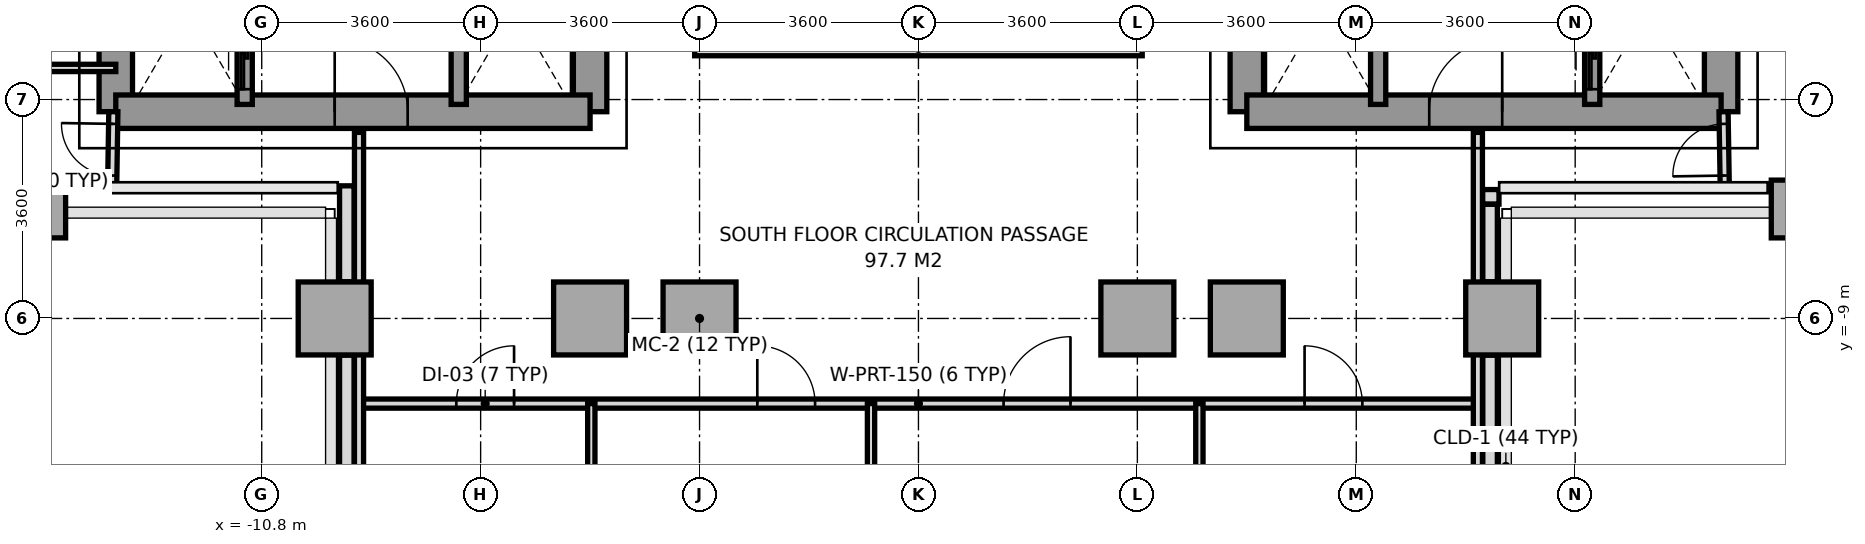
"""IFC4 building model, lengths in metres.
Left out: names, types, materials, properties, quantities, classifications, styles, units other than length and angle.
Written with IfcOpenShell. Run it as: python <this file> out.ifc"""

import sys

from ifc_helpers import new_model, si_unit, direction, frame, frame_2d, origin, origin_2d, place, context, subcontext, project, spatial, rectangle, extrude, source, transform, mapped, element, fill, save


model = new_model("IFC4")
c1 = context("Model", 3, precision=1e-05, world=origin(), true_north=direction((0.0, 1.0)))
c2 = subcontext(c1, "Body", "Model", "MODEL_VIEW")
j1 = project(units=[si_unit("LENGTHUNIT", "METRE"), si_unit("PLANEANGLEUNIT", "RADIAN")], contexts=[c1])
p1 = place(None, origin())
s1 = spatial("IfcSite", under=j1, at=p1, CompositionType="ELEMENT")
p2 = place(p1, origin())
s2 = spatial("IfcBuilding", under=s1, at=p2, CompositionType="ELEMENT")
p3 = place(p2, frame((0.0, 0.0, 71.4)))
s3 = spatial("IfcBuildingStorey", under=s2, at=p3, CompositionType="ELEMENT", Elevation=71.4)
m1 = source(origin(), c2, "Body", "SweptSolid", [
    extrude(rectangle(XDim=0.75, YDim=0.95, at=origin_2d()), origin(), (0.0, 0.0, 1.0), 3.2),
])
p4 = place(p3, frame((-14.4, -7.2, 0.0), z_axis=(0.0, 0.0, 1.0), x_axis=(1.0, 0.0, 0.0)))
e1 = element("IfcColumn", 1, at=p4, inside=s3, PredefinedType="COLUMN", context=c2, shape_type="MappedRepresentation", body=[
    mapped(m1, transform((0.0, 0.0, 0.0), x_axis=(1.0, 0.0, 0.0), y_axis=(0.0, 1.0, 0.0), z_axis=(0.0, 0.0, 1.0), scale=1.0)),
])
m2 = source(origin(), c2, "Body", "SweptSolid", [
    extrude(rectangle(XDim=1.2, YDim=1.2, at=origin_2d()), origin(), (0.0, 0.0, 1.0), 3.2),
])
for number, where, z_axis, x_axis in (
    (2, (-9.6, -9.0, 0.0), (0.0, 0.0, 1.0), (1.0, 0.0, 0.0)),
    (3, (-5.4, -9.0, 0.0), (0.0, 0.0, 1.0), (1.0, 0.0, 0.0)),
    (4, (-3.6, -9.0, 0.0), (0.0, 0.0, 1.0), (1.0, 0.0, 0.0)),
    (5, (3.6, -9.0, 0.0), (0.0, 0.0, 1.0), (1.0, 0.0, 0.0)),
    (6, (5.4, -9.0, 0.0), (0.0, 0.0, 1.0), (1.0, 0.0, 0.0)),
    (7, (9.6, -9.0, 0.0), (0.0, 0.0, 1.0), (1.0, 0.0, 0.0)),
):
    element("IfcColumn", number, at=place(p3, frame(where, z_axis=z_axis, x_axis=x_axis)), inside=s3, PredefinedType="COLUMN", context=c2, shape_type="MappedRepresentation", body=[
        mapped(m2, transform((0.0, 0.0, 0.0), x_axis=(1.0, 0.0, 0.0), y_axis=(0.0, 1.0, 0.0), z_axis=(0.0, 0.0, 1.0), scale=1.0)),
    ])
p5 = place(p3, frame((14.4, -7.2, 0.0), z_axis=(0.0, 0.0, 1.0), x_axis=(1.0, 0.0, 0.0)))
e8 = element("IfcColumn", 8, at=p5, inside=s3, PredefinedType="COLUMN", context=c2, shape_type="MappedRepresentation", body=[
    mapped(m1, transform((0.0, 0.0, 0.0), x_axis=(1.0, 0.0, 0.0), y_axis=(0.0, 1.0, 0.0), z_axis=(0.0, 0.0, 1.0), scale=1.0)),
])
p6 = place(p3, frame((9.547, -7.0, 0.0), z_axis=(0.0, 0.0, 1.0), x_axis=(-1.0, 0.0, 0.0)))
e9 = element("IfcWall", 9, at=p6, inside=s3, PredefinedType="PARAPET", context=c2, shape_type="SweptSolid", body=[
    extrude(rectangle(XDim=0.269, YDim=0.24, at=frame_2d((0.135, 0.0))), origin(), (0.0, 0.0, 1.0), 1.15),
])
p7 = place(p3, frame((9.4, -7.123, 0.0), z_axis=(0.0, 0.0, 1.0), x_axis=(0.0, -1.0, 0.0)))
e10 = element("IfcWall", 10, at=p7, inside=s3, PredefinedType="PARAPET", context=c2, shape_type="SweptSolid", body=[
    extrude(rectangle(XDim=1.274, YDim=0.24, at=frame_2d((0.637, 0.0))), origin(), (0.0, 0.0, 1.0), 1.15),
])
p8 = place(p3, frame((9.4, -9.603, 0.0), z_axis=(0.0, 0.0, 1.0), x_axis=(0.0, -1.0, 0.0)))
e11 = element("IfcWall", 11, at=p8, inside=s3, PredefinedType="PARAPET", context=c2, shape_type="SweptSolid", body=[
    extrude(rectangle(XDim=6.0, YDim=0.24, at=frame_2d((3.0, 0.0))), origin(), (0.0, 0.0, 1.0), 1.15),
])
p9 = place(p3, frame((-9.4, -15.358, 0.0), z_axis=(0.0, 0.0, 1.0), x_axis=(0.0, 1.0, 0.0)))
e12 = element("IfcWall", 12, at=p9, inside=s3, PredefinedType="PARAPET", context=c2, shape_type="SweptSolid", body=[
    extrude(rectangle(XDim=5.755, YDim=0.24, at=frame_2d((2.877, 0.0))), origin(), (0.0, 0.0, 1.0), 1.15),
])
p10 = place(p3, frame((-9.4, -8.397, 0.0), z_axis=(0.0, 0.0, 1.0), x_axis=(0.0, 1.0, 0.0)))
e13 = element("IfcWall", 13, at=p10, inside=s3, PredefinedType="PARAPET", context=c2, shape_type="SweptSolid", body=[
    extrude(rectangle(XDim=1.578, YDim=0.24, at=frame_2d((0.789, 0.0))), origin(), (0.0, 0.0, 1.0), 1.15),
])
p11 = place(p3, frame((-13.2, -5.6, 0.0), z_axis=(0.0, 0.0, 1.0), x_axis=(0.0, 1.0, 0.0)))
e14 = element("IfcWall", 14, at=p11, inside=s3, PredefinedType="SHEAR", context=c2, shape_type="SweptSolid", body=[
    extrude(rectangle(XDim=11.2, YDim=0.55, at=frame_2d((5.6, 0.0))), origin(), (0.0, 0.0, 1.0), 3.2),
])
p12 = place(p3, frame((-5.4, -5.6, 0.0), z_axis=(0.0, 0.0, 1.0), x_axis=(0.0, 1.0, 0.0)))
e15 = element("IfcWall", 15, at=p12, inside=s3, PredefinedType="SHEAR", context=c2, shape_type="SweptSolid", body=[
    extrude(rectangle(XDim=12.5, YDim=0.55, at=frame_2d((6.25, 0.0))), origin(), (0.0, 0.0, 1.0), 3.2),
])
p13 = place(p12, frame((4.55, 0.0, 0.0)))
e16 = element("IfcOpeningElement", 16, at=p13, cuts=e15, PredefinedType="OPENING", context=c2, shape_type="SweptSolid", body=[
    extrude(rectangle(XDim=1.2, YDim=2.2, at=frame_2d((0.6, 1.1))), frame((0.0, 0.285, 0.0), z_axis=(0.0, -1.0, 0.0), x_axis=(1.0, 0.0, 0.0)), (0.0, 0.0, 1.0), 0.57),
])
p14 = place(p12, frame((6.86, 0.0, 0.0)))
e17 = element("IfcOpeningElement", 17, at=p14, cuts=e15, PredefinedType="OPENING", context=c2, shape_type="SweptSolid", body=[
    extrude(rectangle(XDim=0.8, YDim=2.1, at=frame_2d((0.4, 1.05))), frame((0.0, 0.285, 0.0), z_axis=(0.0, -1.0, 0.0), x_axis=(1.0, 0.0, 0.0)), (0.0, 0.0, 1.0), 0.57),
])
p15 = place(p3, frame((-13.2, -5.6, 0.0), z_axis=(0.0, 0.0, 1.0), x_axis=(1.0, 0.0, 0.0)))
e18 = element("IfcWall", 18, at=p15, inside=s3, PredefinedType="SHEAR", context=c2, shape_type="SweptSolid", body=[
    extrude(rectangle(XDim=7.8, YDim=0.55, at=frame_2d((3.9, 0.0))), origin(), (0.0, 0.0, 1.0), 3.2),
])
p16 = place(p15, frame((3.6, 0.0, 0.0)))
e19 = element("IfcOpeningElement", 19, at=p16, cuts=e18, PredefinedType="OPENING", context=c2, shape_type="SweptSolid", body=[
    extrude(rectangle(XDim=1.2, YDim=2.2, at=frame_2d((0.6, 1.1))), frame((0.0, 0.285, 0.0), z_axis=(0.0, -1.0, 0.0), x_axis=(1.0, 0.0, 0.0)), (0.0, 0.0, 1.0), 0.57),
])
p17 = place(p3, frame((13.2, -5.6, 0.0), z_axis=(0.0, 0.0, 1.0), x_axis=(0.0, 1.0, 0.0)))
e20 = element("IfcWall", 20, at=p17, inside=s3, PredefinedType="SHEAR", context=c2, shape_type="SweptSolid", body=[
    extrude(rectangle(XDim=11.2, YDim=0.55, at=frame_2d((5.6, 0.0))), origin(), (0.0, 0.0, 1.0), 3.2),
])
p18 = place(p3, frame((5.4, -5.6, 0.0), z_axis=(0.0, 0.0, 1.0), x_axis=(0.0, 1.0, 0.0)))
e21 = element("IfcWall", 21, at=p18, inside=s3, PredefinedType="SHEAR", context=c2, shape_type="SweptSolid", body=[
    extrude(rectangle(XDim=12.5, YDim=0.55, at=frame_2d((6.25, 0.0))), origin(), (0.0, 0.0, 1.0), 3.2),
])
p19 = place(p18, frame((4.55, 0.0, 0.0)))
e22 = element("IfcOpeningElement", 22, at=p19, cuts=e21, PredefinedType="OPENING", context=c2, shape_type="SweptSolid", body=[
    extrude(rectangle(XDim=1.2, YDim=2.2, at=frame_2d((0.6, 1.1))), frame((0.0, 0.285, 0.0), z_axis=(0.0, -1.0, 0.0), x_axis=(1.0, 0.0, 0.0)), (0.0, 0.0, 1.0), 0.57),
])
p20 = place(p18, frame((6.86, 0.0, 0.0)))
e23 = element("IfcOpeningElement", 23, at=p20, cuts=e21, PredefinedType="OPENING", context=c2, shape_type="SweptSolid", body=[
    extrude(rectangle(XDim=0.8, YDim=2.1, at=frame_2d((0.4, 1.05))), frame((0.0, 0.285, 0.0), z_axis=(0.0, -1.0, 0.0), x_axis=(1.0, 0.0, 0.0)), (0.0, 0.0, 1.0), 0.57),
])
p21 = place(p3, frame((5.4, -5.6, 0.0), z_axis=(0.0, 0.0, 1.0), x_axis=(1.0, 0.0, 0.0)))
e24 = element("IfcWall", 24, at=p21, inside=s3, PredefinedType="SHEAR", context=c2, shape_type="SweptSolid", body=[
    extrude(rectangle(XDim=7.8, YDim=0.55, at=frame_2d((3.9, 0.0))), origin(), (0.0, 0.0, 1.0), 3.2),
])
p22 = place(p21, frame((3.0, 0.0, 0.0)))
e25 = element("IfcOpeningElement", 25, at=p22, cuts=e24, PredefinedType="OPENING", context=c2, shape_type="SweptSolid", body=[
    extrude(rectangle(XDim=1.2, YDim=2.2, at=frame_2d((0.6, 1.1))), frame((0.0, 0.285, 0.0), z_axis=(0.0, -1.0, 0.0), x_axis=(1.0, 0.0, 0.0)), (0.0, 0.0, 1.0), 0.57),
])
p23 = place(p3, frame((-11.08, -5.48, 0.0), z_axis=(0.0, 0.0, 1.0), x_axis=(0.0, 1.0, 0.0)))
e26 = element("IfcWall", 26, at=p23, inside=s3, PredefinedType="SOLIDWALL", context=c2, shape_type="SweptSolid", body=[
    extrude(rectangle(XDim=1.6, YDim=0.25, at=frame_2d((0.8, 0.0))), origin(), (0.0, 0.0, 1.0), 3.2),
])
p24 = place(p23, frame((0.25, 0.0, 0.0)))
e27 = element("IfcOpeningElement", 27, at=p24, cuts=e26, PredefinedType="OPENING", context=c2, shape_type="SweptSolid", body=[
    extrude(rectangle(XDim=1.1, YDim=2.2, at=frame_2d((0.55, 1.1))), frame((0.0, 0.135, 0.0), z_axis=(0.0, -1.0, 0.0), x_axis=(1.0, 0.0, 0.0)), (0.0, 0.0, 1.0), 0.27),
])
p25 = place(p3, frame((11.08, -5.48, 0.0), z_axis=(0.0, 0.0, 1.0), x_axis=(0.0, 1.0, 0.0)))
e28 = element("IfcWall", 28, at=p25, inside=s3, PredefinedType="SOLIDWALL", context=c2, shape_type="SweptSolid", body=[
    extrude(rectangle(XDim=1.6, YDim=0.25, at=frame_2d((0.8, 0.0))), origin(), (0.0, 0.0, 1.0), 3.2),
])
p26 = place(p25, frame((0.25, 0.0, 0.0)))
e29 = element("IfcOpeningElement", 29, at=p26, cuts=e28, PredefinedType="OPENING", context=c2, shape_type="SweptSolid", body=[
    extrude(rectangle(XDim=1.1, YDim=2.2, at=frame_2d((0.55, 1.1))), frame((0.0, 0.135, 0.0), z_axis=(0.0, -1.0, 0.0), x_axis=(1.0, 0.0, 0.0)), (0.0, 0.0, 1.0), 0.27),
])
for number, where, z_axis, x_axis in (
    (30, (-7.56, -5.48, 0.0), (0.0, 0.0, 1.0), (0.0, 1.0, 0.0)),
    (31, (7.56, -5.48, 0.0), (0.0, 0.0, 1.0), (0.0, 1.0, 0.0)),
):
    element("IfcWall", number, at=place(p3, frame(where, z_axis=z_axis, x_axis=x_axis)), inside=s3, PredefinedType="SOLIDWALL", context=c2, shape_type="SweptSolid", body=[
        extrude(rectangle(XDim=1.6, YDim=0.25, at=frame_2d((0.8, 0.0))), origin(), (0.0, 0.0, 1.0), 3.2),
    ])
p27 = place(p3, frame((-9.2, -10.4, 0.0), z_axis=(0.0, 0.0, 1.0), x_axis=(1.0, 0.0, 0.0)))
e32 = element("IfcWall", 32, at=p27, inside=s3, PredefinedType="PARTITIONING", context=c2, shape_type="SweptSolid", body=[
    extrude(rectangle(XDim=18.4, YDim=0.15, at=frame_2d((9.2, 0.0))), origin(), (0.0, 0.0, 1.0), 3.2),
])
p28 = place(p27, frame((1.6, 0.0, 0.0)))
e33 = element("IfcOpeningElement", 33, at=p28, cuts=e32, PredefinedType="OPENING", context=c2, shape_type="SweptSolid", body=[
    extrude(rectangle(XDim=0.95, YDim=2.15, at=frame_2d((0.475, 1.075))), frame((0.0, 0.085, 0.0), z_axis=(0.0, -1.0, 0.0), x_axis=(1.0, 0.0, 0.0)), (0.0, 0.0, 1.0), 0.17),
])
p29 = place(p27, frame((6.55, 0.0, 0.0)))
e34 = element("IfcOpeningElement", 34, at=p29, cuts=e32, PredefinedType="OPENING", context=c2, shape_type="SweptSolid", body=[
    extrude(rectangle(XDim=0.95, YDim=2.15, at=frame_2d((0.475, 1.075))), frame((0.0, 0.085, 0.0), z_axis=(0.0, -1.0, 0.0), x_axis=(1.0, 0.0, 0.0)), (0.0, 0.0, 1.0), 0.17),
])
p30 = place(p27, frame((10.6, 0.0, 0.0)))
e35 = element("IfcOpeningElement", 35, at=p30, cuts=e32, PredefinedType="OPENING", context=c2, shape_type="SweptSolid", body=[
    extrude(rectangle(XDim=1.1, YDim=2.2, at=frame_2d((0.55, 1.1))), frame((0.0, 0.085, 0.0), z_axis=(0.0, -1.0, 0.0), x_axis=(1.0, 0.0, 0.0)), (0.0, 0.0, 1.0), 0.17),
])
p31 = place(p27, frame((15.55, 0.0, 0.0)))
e36 = element("IfcOpeningElement", 36, at=p31, cuts=e32, PredefinedType="OPENING", context=c2, shape_type="SweptSolid", body=[
    extrude(rectangle(XDim=0.95, YDim=2.15, at=frame_2d((0.475, 1.075))), frame((0.0, 0.085, 0.0), z_axis=(0.0, -1.0, 0.0), x_axis=(1.0, 0.0, 0.0)), (0.0, 0.0, 1.0), 0.17),
])
for number, where, z_axis, x_axis in (
    (37, (-9.2, -15.68, 0.0), (0.0, 0.0, 1.0), (0.0, 1.0, 0.0)),
    (38, (9.2, -15.68, 0.0), (0.0, 0.0, 1.0), (0.0, 1.0, 0.0)),
):
    element("IfcWall", number, at=place(p3, frame(where, z_axis=z_axis, x_axis=x_axis)), inside=s3, PredefinedType="PARTITIONING", context=c2, shape_type="SweptSolid", body=[
        extrude(rectangle(XDim=9.74, YDim=0.15, at=frame_2d((4.87, 0.0))), origin(), (0.0, 0.0, 1.0), 2.65),
    ])
for number, where, z_axis, x_axis in (
    (39, (-5.38, -24.65, 0.0), (0.0, 0.0, 1.0), (0.0, 1.0, 0.0)),
    (40, (-0.78, -24.65, 0.0), (0.0, 0.0, 1.0), (0.0, 1.0, 0.0)),
    (41, (4.62, -24.65, 0.0), (0.0, 0.0, 1.0), (0.0, 1.0, 0.0)),
):
    element("IfcWall", number, at=place(p3, frame(where, z_axis=z_axis, x_axis=x_axis)), inside=s3, PredefinedType="PARTITIONING", context=c2, shape_type="SweptSolid", body=[
        extrude(rectangle(XDim=14.25, YDim=0.12, at=frame_2d((7.125, 0.0))), origin(), (0.0, 0.0, 1.0), 2.65),
    ])
p32 = place(p3, frame((-13.26, -6.85, 0.0), z_axis=(0.0, 0.0, 1.0), x_axis=(0.016013571389, 0.999871774545, 0.0)))
e42 = element("IfcWall", 42, at=p32, inside=s3, PredefinedType="PARTITIONING", context=c2, shape_type="SweptSolid", body=[
    extrude(rectangle(XDim=1.25, YDim=0.15, at=frame_2d((0.625, 0.0))), origin(), (0.0, 0.0, 1.0), 3.2),
])
p33 = place(p32, frame((0.2, 0.0, 0.0)))
e43 = element("IfcOpeningElement", 43, at=p33, cuts=e42, PredefinedType="OPENING", context=c2, shape_type="SweptSolid", body=[
    extrude(rectangle(XDim=0.85, YDim=2.1, at=frame_2d((0.425, 1.05))), frame((0.0, 0.085, 0.0), z_axis=(0.0, -1.0, 0.0), x_axis=(1.0, 0.0, 0.0)), (0.0, 0.0, 1.0), 0.17),
])
p34 = place(p3, frame((-24.57, -4.88, 0.0), z_axis=(0.0, 0.0, 1.0), x_axis=(1.0, 0.0, 0.0)))
e44 = element("IfcWall", 44, at=p34, inside=s3, PredefinedType="PARTITIONING", context=c2, shape_type="SweptSolid", body=[
    extrude(rectangle(XDim=11.37, YDim=0.12, at=frame_2d((5.685, 0.0))), origin(), (0.0, 0.0, 1.0), 2.7),
])
p35 = place(p34, frame((2.2, 0.0, 0.0)))
e45 = element("IfcOpeningElement", 45, at=p35, cuts=e44, PredefinedType="OPENING", context=c2, shape_type="SweptSolid", body=[
    extrude(rectangle(XDim=0.95, YDim=2.15, at=frame_2d((0.475, 1.075))), frame((0.0, 0.07, 0.0), z_axis=(0.0, -1.0, 0.0), x_axis=(1.0, 0.0, 0.0)), (0.0, 0.0, 1.0), 0.14),
])
p36 = place(p3, frame((13.26, -6.85, 0.0), z_axis=(0.0, 0.0, 1.0), x_axis=(-0.016013571389, 0.999871774545, 0.0)))
e46 = element("IfcWall", 46, at=p36, inside=s3, PredefinedType="PARTITIONING", context=c2, shape_type="SweptSolid", body=[
    extrude(rectangle(XDim=1.25, YDim=0.15, at=frame_2d((0.625, 0.0))), origin(), (0.0, 0.0, 1.0), 3.2),
])
p37 = place(p36, frame((0.2, 0.0, 0.0)))
e47 = element("IfcOpeningElement", 47, at=p37, cuts=e46, PredefinedType="OPENING", context=c2, shape_type="SweptSolid", body=[
    extrude(rectangle(XDim=0.85, YDim=2.1, at=frame_2d((0.425, 1.05))), frame((0.0, 0.085, 0.0), z_axis=(0.0, -1.0, 0.0), x_axis=(1.0, 0.0, 0.0)), (0.0, 0.0, 1.0), 0.17),
])
p38 = place(p3, frame((-3.68, -4.56, 0.0), z_axis=(0.0, 0.0, 1.0), x_axis=(1.0, 0.0, 0.0)))
e48 = element("IfcWall", 48, at=p38, inside=s3, PredefinedType="PARAPET", context=c2, shape_type="SweptSolid", body=[
    extrude(rectangle(XDim=7.36, YDim=0.24, at=frame_2d((3.68, 0.0))), origin(), (0.0, 0.0, 1.0), 1.15),
])
m3 = source(origin(), c2, "Body", "SweptSolid", [
    extrude(rectangle(XDim=1.2, YDim=2.2, at=frame_2d((0.6, 1.1))), frame((0.0, 0.025, 0.0), z_axis=(0.0, -1.0, 0.0), x_axis=(1.0, 0.0, 0.0)), (0.0, 0.0, 1.0), 0.05),
])
p39 = place(p16, origin())
e49 = element("IfcDoor", 49, at=p39, inside=s3, OperationType="SINGLE_SWING_LEFT", PredefinedType="DOOR", context=c2, shape_type="MappedRepresentation", body=[
    mapped(m3, transform((0.0, 0.0, 0.0), x_axis=(1.0, 0.0, 0.0), y_axis=(0.0, 1.0, 0.0), z_axis=(0.0, 0.0, 1.0), scale=1.0)),
])
fill(e19, e49)
p40 = place(p22, origin())
e50 = element("IfcDoor", 50, at=p40, inside=s3, OperationType="SINGLE_SWING_RIGHT", PredefinedType="DOOR", context=c2, shape_type="MappedRepresentation", body=[
    mapped(m3, transform((0.0, 0.0, 0.0), x_axis=(1.0, 0.0, 0.0), y_axis=(0.0, 1.0, 0.0), z_axis=(0.0, 0.0, 1.0), scale=1.0)),
])
fill(e25, e50)
m4 = source(origin(), c2, "Body", "SweptSolid", [
    extrude(rectangle(XDim=1.1, YDim=2.2, at=frame_2d((0.55, 1.1))), frame((0.0, 0.025, 0.0), z_axis=(0.0, -1.0, 0.0), x_axis=(1.0, 0.0, 0.0)), (0.0, 0.0, 1.0), 0.05),
])
p41 = place(p24, origin())
e51 = element("IfcDoor", 51, at=p41, inside=s3, OperationType="SLIDING_TO_LEFT", PredefinedType="DOOR", context=c2, shape_type="MappedRepresentation", body=[
    mapped(m4, transform((0.0, 0.0, 0.0), x_axis=(1.0, 0.0, 0.0), y_axis=(0.0, 1.0, 0.0), z_axis=(0.0, 0.0, 1.0), scale=1.0)),
])
fill(e27, e51)
p42 = place(p26, origin())
e52 = element("IfcDoor", 52, at=p42, inside=s3, OperationType="SLIDING_TO_LEFT", PredefinedType="DOOR", context=c2, shape_type="MappedRepresentation", body=[
    mapped(m4, transform((0.0, 0.0, 0.0), x_axis=(1.0, 0.0, 0.0), y_axis=(0.0, 1.0, 0.0), z_axis=(0.0, 0.0, 1.0), scale=1.0)),
])
fill(e29, e52)
m5 = source(origin(), c2, "Body", "SweptSolid", [
    extrude(rectangle(XDim=0.95, YDim=2.15, at=frame_2d((0.475, 1.075))), frame((0.0, 0.025, 0.0), z_axis=(0.0, -1.0, 0.0), x_axis=(1.0, 0.0, 0.0)), (0.0, 0.0, 1.0), 0.05),
])
p43 = place(p28, origin())
e53 = element("IfcDoor", 53, at=p43, inside=s3, OperationType="SINGLE_SWING_RIGHT", PredefinedType="DOOR", context=c2, shape_type="MappedRepresentation", body=[
    mapped(m5, transform((0.0, 0.0, 0.0), x_axis=(1.0, 0.0, 0.0), y_axis=(0.0, 1.0, 0.0), z_axis=(0.0, 0.0, 1.0), scale=1.0)),
])
fill(e33, e53)
p44 = place(p29, origin())
e54 = element("IfcDoor", 54, at=p44, inside=s3, OperationType="SINGLE_SWING_LEFT", PredefinedType="DOOR", context=c2, shape_type="MappedRepresentation", body=[
    mapped(m5, transform((0.0, 0.0, 0.0), x_axis=(1.0, 0.0, 0.0), y_axis=(0.0, 1.0, 0.0), z_axis=(0.0, 0.0, 1.0), scale=1.0)),
])
fill(e34, e54)
p45 = place(p30, origin())
e55 = element("IfcDoor", 55, at=p45, inside=s3, OperationType="SINGLE_SWING_RIGHT", PredefinedType="DOOR", context=c2, shape_type="MappedRepresentation", body=[
    mapped(m4, transform((0.0, 0.0, 0.0), x_axis=(1.0, 0.0, 0.0), y_axis=(0.0, 1.0, 0.0), z_axis=(0.0, 0.0, 1.0), scale=1.0)),
])
fill(e35, e55)
p46 = place(p31, origin())
e56 = element("IfcDoor", 56, at=p46, inside=s3, OperationType="SINGLE_SWING_LEFT", PredefinedType="DOOR", context=c2, shape_type="MappedRepresentation", body=[
    mapped(m5, transform((0.0, 0.0, 0.0), x_axis=(1.0, 0.0, 0.0), y_axis=(0.0, 1.0, 0.0), z_axis=(0.0, 0.0, 1.0), scale=1.0)),
])
fill(e36, e56)
m6 = source(origin(), c2, "Body", "SweptSolid", [
    extrude(rectangle(XDim=0.85, YDim=2.1, at=frame_2d((0.425, 1.05))), frame((0.0, 0.025, 0.0), z_axis=(0.0, -1.0, 0.0), x_axis=(1.0, 0.0, 0.0)), (0.0, 0.0, 1.0), 0.05),
])
p47 = place(p33, origin())
e57 = element("IfcDoor", 57, at=p47, inside=s3, OperationType="SINGLE_SWING_RIGHT", PredefinedType="DOOR", context=c2, shape_type="MappedRepresentation", body=[
    mapped(m6, transform((0.0, 0.0, 0.0), x_axis=(1.0, 0.0, 0.0), y_axis=(0.0, 1.0, 0.0), z_axis=(0.0, 0.0, 1.0), scale=1.0)),
])
fill(e43, e57)
p48 = place(p37, origin())
e58 = element("IfcDoor", 58, at=p48, inside=s3, OperationType="SINGLE_SWING_LEFT", PredefinedType="DOOR", context=c2, shape_type="MappedRepresentation", body=[
    mapped(m6, transform((0.0, 0.0, 0.0), x_axis=(1.0, 0.0, 0.0), y_axis=(0.0, 1.0, 0.0), z_axis=(0.0, 0.0, 1.0), scale=1.0)),
])
fill(e47, e58)
save(model, sys.argv[1])
